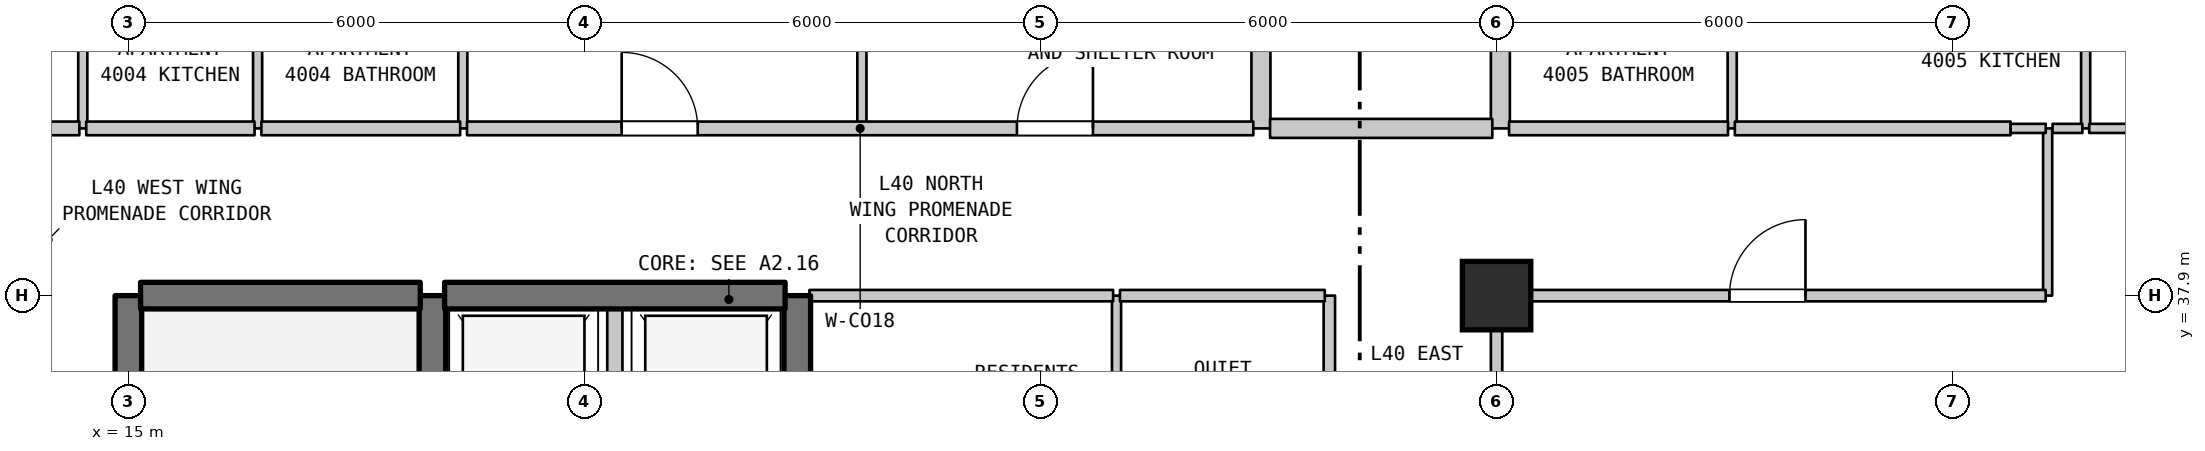
"""IFC4 building model, lengths in metres.
Left out: names, types, materials, properties, quantities, classifications, styles, units other than length and angle.
Written with IfcOpenShell. Run it as: python <this file> out.ifc"""

import sys

from ifc_helpers import new_model, si_unit, direction, frame, frame_2d, origin, origin_2d, place, context, subcontext, project, spatial, rectangle, extrude, element, fill, save


model = new_model("IFC4")
c1 = context("Model", 3, precision=1e-05, world=origin(), true_north=direction((0.0, 1.0)))
c2 = subcontext(c1, "Body", "Model", "MODEL_VIEW")
j1 = project(units=[si_unit("LENGTHUNIT", "METRE"), si_unit("PLANEANGLEUNIT", "RADIAN")], contexts=[c1])
p1 = place(None, origin())
s1 = spatial("IfcSite", under=j1, at=p1, CompositionType="ELEMENT")
p2 = place(p1, origin())
s2 = spatial("IfcBuilding", under=s1, at=p2, CompositionType="ELEMENT")
p3 = place(p2, frame((0.0, 0.0, 164.6)))
s3 = spatial("IfcBuildingStorey", under=s2, at=p3, CompositionType="ELEMENT", Elevation=164.6)
p4 = place(p3, frame((33.0, 37.9, 0.0), z_axis=(0.0, 0.0, 1.0), x_axis=(1.0, 0.0, 0.0)))
e1 = element("IfcColumn", 1, at=p4, inside=s3, PredefinedType="COLUMN", context=c2, shape_type="SweptSolid", body=[
    extrude(rectangle(XDim=0.9, YDim=0.9, at=origin_2d()), origin(), (0.0, 0.0, 1.0), 4.5),
])
p5 = place(p3, frame((39.358, 52.35, 0.0), z_axis=(0.0, 0.0, 1.0), x_axis=(0.224849558511, -0.974393491377, 0.0)))
e2 = element("IfcWall", 2, at=p5, inside=s3, PredefinedType="STANDARD", context=c2, shape_type="SweptSolid", body=[
    extrude(rectangle(XDim=25.093, YDim=0.26, at=frame_2d((12.546, 0.0))), origin(), (0.0, 0.0, 1.0), 4.19),
])
p6 = place(p5, frame((16.689, 0.0, 0.0)))
e3 = element("IfcOpeningElement", 3, at=p6, cuts=e2, PredefinedType="OPENING", context=c2, shape_type="SweptSolid", body=[
    extrude(rectangle(XDim=1.4, YDim=2.2, at=frame_2d((0.7, 1.1))), frame((0.0, 0.14, 0.0), z_axis=(0.0, -1.0, 0.0), x_axis=(1.0, 0.0, 0.0)), (0.0, 0.0, 1.0), 0.28),
])
p7 = place(p5, frame((0.915, 0.0, 0.9)))
e4 = element("IfcOpeningElement", 4, at=p7, cuts=e2, PredefinedType="OPENING", context=c2, shape_type="SweptSolid", body=[
    extrude(rectangle(XDim=1.4, YDim=1.85, at=frame_2d((0.7, 0.925))), frame((0.0, 0.14, 0.0), z_axis=(0.0, -1.0, 0.0), x_axis=(1.0, 0.0, 0.0)), (0.0, 0.0, 1.0), 0.28),
])
p8 = place(p5, frame((3.344, 0.0, 0.9)))
e5 = element("IfcOpeningElement", 5, at=p8, cuts=e2, PredefinedType="OPENING", context=c2, shape_type="SweptSolid", body=[
    extrude(rectangle(XDim=1.3, YDim=1.9, at=frame_2d((0.65, 0.95))), frame((0.0, 0.14, 0.0), z_axis=(0.0, -1.0, 0.0), x_axis=(1.0, 0.0, 0.0)), (0.0, 0.0, 1.0), 0.28),
])
p9 = place(p5, frame((5.323, 0.0, 0.9)))
e6 = element("IfcOpeningElement", 6, at=p9, cuts=e2, PredefinedType="OPENING", context=c2, shape_type="SweptSolid", body=[
    extrude(rectangle(XDim=1.4, YDim=1.85, at=frame_2d((0.7, 0.925))), frame((0.0, 0.14, 0.0), z_axis=(0.0, -1.0, 0.0), x_axis=(1.0, 0.0, 0.0)), (0.0, 0.0, 1.0), 0.28),
])
p10 = place(p5, frame((8.202, 0.0, 0.9)))
e7 = element("IfcOpeningElement", 7, at=p10, cuts=e2, PredefinedType="OPENING", context=c2, shape_type="SweptSolid", body=[
    extrude(rectangle(XDim=1.3, YDim=1.9, at=frame_2d((0.65, 0.95))), frame((0.0, 0.14, 0.0), z_axis=(0.0, -1.0, 0.0), x_axis=(1.0, 0.0, 0.0)), (0.0, 0.0, 1.0), 0.28),
])
p11 = place(p5, frame((10.632, 0.0, 0.9)))
e8 = element("IfcOpeningElement", 8, at=p11, cuts=e2, PredefinedType="OPENING", context=c2, shape_type="SweptSolid", body=[
    extrude(rectangle(XDim=1.4, YDim=1.85, at=frame_2d((0.7, 0.925))), frame((0.0, 0.14, 0.0), z_axis=(0.0, -1.0, 0.0), x_axis=(1.0, 0.0, 0.0)), (0.0, 0.0, 1.0), 0.28),
])
p12 = place(p5, frame((13.061, 0.0, 0.9)))
e9 = element("IfcOpeningElement", 9, at=p12, cuts=e2, PredefinedType="OPENING", context=c2, shape_type="SweptSolid", body=[
    extrude(rectangle(XDim=1.3, YDim=1.9, at=frame_2d((0.65, 0.95))), frame((0.0, 0.14, 0.0), z_axis=(0.0, -1.0, 0.0), x_axis=(1.0, 0.0, 0.0)), (0.0, 0.0, 1.0), 0.28),
])
p13 = place(p5, frame((18.369, 0.0, 0.9)))
e10 = element("IfcOpeningElement", 10, at=p13, cuts=e2, PredefinedType="OPENING", context=c2, shape_type="SweptSolid", body=[
    extrude(rectangle(XDim=1.4, YDim=1.85, at=frame_2d((0.7, 0.925))), frame((0.0, 0.14, 0.0), z_axis=(0.0, -1.0, 0.0), x_axis=(1.0, 0.0, 0.0)), (0.0, 0.0, 1.0), 0.28),
])
p14 = place(p5, frame((20.799, 0.0, 0.9)))
e11 = element("IfcOpeningElement", 11, at=p14, cuts=e2, PredefinedType="OPENING", context=c2, shape_type="SweptSolid", body=[
    extrude(rectangle(XDim=1.3, YDim=1.9, at=frame_2d((0.65, 0.95))), frame((0.0, 0.14, 0.0), z_axis=(0.0, -1.0, 0.0), x_axis=(1.0, 0.0, 0.0)), (0.0, 0.0, 1.0), 0.28),
])
p15 = place(p3, frame((14.4, 40.1, 0.0), z_axis=(0.0, 0.0, 1.0), x_axis=(0.0, 1.0, 0.0)))
e12 = element("IfcWall", 12, at=p15, inside=s3, PredefinedType="PARTITIONING", context=c2, shape_type="SweptSolid", body=[
    extrude(rectangle(XDim=2.3, YDim=0.12, at=frame_2d((1.15, 0.0))), origin(), (0.0, 0.0, 1.0), 4.19),
])
p16 = place(p3, frame((15.0, 31.1, 0.0), z_axis=(0.0, 0.0, 1.0), x_axis=(0.0, 1.0, 0.0)))
e13 = element("IfcWall", 13, at=p16, inside=s3, PredefinedType="SHEAR", context=c2, shape_type="SweptSolid", body=[
    extrude(rectangle(XDim=6.8, YDim=0.35, at=frame_2d((3.4, 0.0))), origin(), (0.0, 0.0, 1.0), 4.19),
])
p17 = place(p3, frame((16.7, 40.1, 0.0), z_axis=(0.0, 0.0, 1.0), x_axis=(0.0, 1.0, 0.0)))
e14 = element("IfcWall", 14, at=p17, inside=s3, PredefinedType="PARTITIONING", context=c2, shape_type="SweptSolid", body=[
    extrude(rectangle(XDim=2.3, YDim=0.12, at=frame_2d((1.15, 0.0))), origin(), (0.0, 0.0, 1.0), 4.19),
])
p18 = place(p3, frame((19.0, 35.0, 0.0), z_axis=(0.0, 0.0, 1.0), x_axis=(0.0, 1.0, 0.0)))
e15 = element("IfcWall", 15, at=p18, inside=s3, PredefinedType="SHEAR", context=c2, shape_type="SweptSolid", body=[
    extrude(rectangle(XDim=2.9, YDim=0.35, at=frame_2d((1.45, 0.0))), origin(), (0.0, 0.0, 1.0), 4.19),
])
p19 = place(p3, frame((19.4, 40.1, 0.0), z_axis=(0.0, 0.0, 1.0), x_axis=(0.0, 1.0, 0.0)))
e16 = element("IfcWall", 16, at=p19, inside=s3, PredefinedType="PARTITIONING", context=c2, shape_type="SweptSolid", body=[
    extrude(rectangle(XDim=2.3, YDim=0.12, at=frame_2d((1.15, 0.0))), origin(), (0.0, 0.0, 1.0), 4.19),
])
p20 = place(p3, frame((21.4, 35.0, 0.0), z_axis=(0.0, 0.0, 1.0), x_axis=(0.0, 1.0, 0.0)))
e17 = element("IfcWall", 17, at=p20, inside=s3, PredefinedType="STANDARD", context=c2, shape_type="SweptSolid", body=[
    extrude(rectangle(XDim=2.9, YDim=0.2, at=frame_2d((1.45, 0.0))), origin(), (0.0, 0.0, 1.0), 4.19),
])
p21 = place(p3, frame((23.8, 35.0, 0.0), z_axis=(0.0, 0.0, 1.0), x_axis=(0.0, 1.0, 0.0)))
e18 = element("IfcWall", 18, at=p21, inside=s3, PredefinedType="SHEAR", context=c2, shape_type="SweptSolid", body=[
    extrude(rectangle(XDim=2.9, YDim=0.35, at=frame_2d((1.45, 0.0))), origin(), (0.0, 0.0, 1.0), 4.19),
])
p22 = place(p3, frame((24.65, 40.1, 0.0), z_axis=(0.0, 0.0, 1.0), x_axis=(0.0, 1.0, 0.0)))
e19 = element("IfcWall", 19, at=p22, inside=s3, PredefinedType="PARTITIONING", context=c2, shape_type="SweptSolid", body=[
    extrude(rectangle(XDim=2.05, YDim=0.12, at=frame_2d((1.025, 0.0))), origin(), (0.0, 0.0, 1.0), 4.19),
])
p23 = place(p3, frame((28.0, 35.0, 0.0), z_axis=(0.0, 0.0, 1.0), x_axis=(0.0, 1.0, 0.0)))
e20 = element("IfcWall", 20, at=p23, inside=s3, PredefinedType="PARTITIONING", context=c2, shape_type="SweptSolid", body=[
    extrude(rectangle(XDim=2.9, YDim=0.12, at=frame_2d((1.45, 0.0))), origin(), (0.0, 0.0, 1.0), 4.19),
])
p24 = place(p3, frame((29.9, 40.1, 0.0), z_axis=(0.0, 0.0, 1.0), x_axis=(0.0, 1.0, 0.0)))
e21 = element("IfcWall", 21, at=p24, inside=s3, PredefinedType="STANDARD", context=c2, shape_type="SweptSolid", body=[
    extrude(rectangle(XDim=2.3, YDim=0.25, at=frame_2d((1.15, 0.0))), origin(), (0.0, 0.0, 1.0), 4.19),
])
p25 = place(p3, frame((30.8, 35.0, 0.0), z_axis=(0.0, 0.0, 1.0), x_axis=(0.0, 1.0, 0.0)))
e22 = element("IfcWall", 22, at=p25, inside=s3, PredefinedType="STANDARD", context=c2, shape_type="SweptSolid", body=[
    extrude(rectangle(XDim=2.9, YDim=0.15, at=frame_2d((1.45, 0.0))), origin(), (0.0, 0.0, 1.0), 4.19),
])
p26 = place(p3, frame((33.0, 32.54, 0.0), z_axis=(0.0, 0.0, 1.0), x_axis=(0.0, 1.0, 0.0)))
e23 = element("IfcWall", 23, at=p26, inside=s3, PredefinedType="STANDARD", context=c2, shape_type="SweptSolid", body=[
    extrude(rectangle(XDim=5.36, YDim=0.15, at=frame_2d((2.68, 0.0))), origin(), (0.0, 0.0, 1.0), 3.69),
])
p27 = place(p26, frame((2.109, 0.0, 0.0)))
e24 = element("IfcOpeningElement", 24, at=p27, cuts=e23, PredefinedType="OPENING", context=c2, shape_type="SweptSolid", body=[
    extrude(rectangle(XDim=1.0, YDim=2.15, at=frame_2d((0.5, 1.075))), frame((0.0, 0.085, 0.0), z_axis=(0.0, -1.0, 0.0), x_axis=(1.0, 0.0, 0.0)), (0.0, 0.0, 1.0), 0.17),
])
p28 = place(p3, frame((33.05, 40.1, 0.0), z_axis=(0.0, 0.0, 1.0), x_axis=(0.0, 1.0, 0.0)))
e25 = element("IfcWall", 25, at=p28, inside=s3, PredefinedType="STANDARD", context=c2, shape_type="SweptSolid", body=[
    extrude(rectangle(XDim=2.3, YDim=0.25, at=frame_2d((1.15, 0.0))), origin(), (0.0, 0.0, 1.0), 3.59),
])
p29 = place(p3, frame((36.1, 40.1, 0.0), z_axis=(0.0, 0.0, 1.0), x_axis=(0.0, 1.0, 0.0)))
e26 = element("IfcWall", 26, at=p29, inside=s3, PredefinedType="PARTITIONING", context=c2, shape_type="SweptSolid", body=[
    extrude(rectangle(XDim=2.3, YDim=0.12, at=frame_2d((1.15, 0.0))), origin(), (0.0, 0.0, 1.0), 4.19),
])
p30 = place(p3, frame((40.25, 37.9, 0.0), z_axis=(0.0, 0.0, 1.0), x_axis=(0.0, 1.0, 0.0)))
e27 = element("IfcWall", 27, at=p30, inside=s3, PredefinedType="PARTITIONING", context=c2, shape_type="SweptSolid", body=[
    extrude(rectangle(XDim=2.2, YDim=0.12, at=frame_2d((1.1, 0.0))), origin(), (0.0, 0.0, 1.0), 4.19),
])
p31 = place(p3, frame((40.75, 40.1, 0.0), z_axis=(0.0, 0.0, 1.0), x_axis=(0.0, 1.0, 0.0)))
e28 = element("IfcWall", 28, at=p31, inside=s3, PredefinedType="PARTITIONING", context=c2, shape_type="SweptSolid", body=[
    extrude(rectangle(XDim=2.3, YDim=0.12, at=frame_2d((1.15, 0.0))), origin(), (0.0, 0.0, 1.0), 4.19),
])
p32 = place(p3, frame((15.16, 37.9, 0.0), z_axis=(0.0, 0.0, 1.0), x_axis=(1.0, 0.0, 0.0)))
e29 = element("IfcWall", 29, at=p32, inside=s3, PredefinedType="SHEAR", context=c2, shape_type="SweptSolid", body=[
    extrude(rectangle(XDim=3.68, YDim=0.35, at=frame_2d((1.84, 0.0))), origin(), (0.0, 0.0, 1.0), 4.19),
])
p33 = place(p3, frame((19.16, 37.9, 0.0), z_axis=(0.0, 0.0, 1.0), x_axis=(1.0, 0.0, 0.0)))
e30 = element("IfcWall", 30, at=p33, inside=s3, PredefinedType="SHEAR", context=c2, shape_type="SweptSolid", body=[
    extrude(rectangle(XDim=4.48, YDim=0.35, at=frame_2d((2.24, 0.0))), origin(), (0.0, 0.0, 1.0), 4.19),
])
p34 = place(p3, frame((23.96, 37.9, 0.0), z_axis=(0.0, 0.0, 1.0), x_axis=(1.0, 0.0, 0.0)))
e31 = element("IfcWall", 31, at=p34, inside=s3, PredefinedType="STANDARD", context=c2, shape_type="SweptSolid", body=[
    extrude(rectangle(XDim=3.995, YDim=0.15, at=frame_2d((1.998, 0.0))), origin(), (0.0, 0.0, 1.0), 3.69),
])
p35 = place(p3, frame((28.045, 37.9, 0.0), z_axis=(0.0, 0.0, 1.0), x_axis=(1.0, 0.0, 0.0)))
e32 = element("IfcWall", 32, at=p35, inside=s3, PredefinedType="STANDARD", context=c2, shape_type="SweptSolid", body=[
    extrude(rectangle(XDim=2.695, YDim=0.15, at=frame_2d((1.348, 0.0))), origin(), (0.0, 0.0, 1.0), 3.69),
])
p36 = place(p3, frame((33.06, 37.9, 0.0), z_axis=(0.0, 0.0, 1.0), x_axis=(1.0, 0.0, 0.0)))
e33 = element("IfcWall", 33, at=p36, inside=s3, PredefinedType="STANDARD", context=c2, shape_type="SweptSolid", body=[
    extrude(rectangle(XDim=7.164, YDim=0.15, at=frame_2d((3.582, 0.0))), origin(), (0.0, 0.0, 1.0), 4.19),
])
p37 = place(p36, frame((3.004, 0.0, 0.0)))
e34 = element("IfcOpeningElement", 34, at=p37, cuts=e33, PredefinedType="OPENING", context=c2, shape_type="SweptSolid", body=[
    extrude(rectangle(XDim=1.0, YDim=2.15, at=frame_2d((0.5, 1.075))), frame((0.0, 0.085, 0.0), z_axis=(0.0, -1.0, 0.0), x_axis=(1.0, 0.0, 0.0)), (0.0, 0.0, 1.0), 0.17),
])
p38 = place(p3, frame((12.875, 40.1, 0.0), z_axis=(0.0, 0.0, 1.0), x_axis=(1.0, 0.0, 0.0)))
e35 = element("IfcWall", 35, at=p38, inside=s3, PredefinedType="STANDARD", context=c2, shape_type="SweptSolid", body=[
    extrude(rectangle(XDim=1.48, YDim=0.18, at=frame_2d((0.74, 0.0))), origin(), (0.0, 0.0, 1.0), 4.19),
])
p39 = place(p3, frame((14.445, 40.1, 0.0), z_axis=(0.0, 0.0, 1.0), x_axis=(1.0, 0.0, 0.0)))
e36 = element("IfcWall", 36, at=p39, inside=s3, PredefinedType="STANDARD", context=c2, shape_type="SweptSolid", body=[
    extrude(rectangle(XDim=2.215, YDim=0.18, at=frame_2d((1.107, 0.0))), origin(), (0.0, 0.0, 1.0), 4.19),
])
p40 = place(p3, frame((16.75, 40.1, 0.0), z_axis=(0.0, 0.0, 1.0), x_axis=(1.0, 0.0, 0.0)))
e37 = element("IfcWall", 37, at=p40, inside=s3, PredefinedType="STANDARD", context=c2, shape_type="SweptSolid", body=[
    extrude(rectangle(XDim=2.615, YDim=0.18, at=frame_2d((1.308, 0.0))), origin(), (0.0, 0.0, 1.0), 4.19),
])
p41 = place(p3, frame((19.455, 40.1, 0.0), z_axis=(0.0, 0.0, 1.0), x_axis=(1.0, 0.0, 0.0)))
e38 = element("IfcWall", 38, at=p41, inside=s3, PredefinedType="STANDARD", context=c2, shape_type="SweptSolid", body=[
    extrude(rectangle(XDim=10.345, YDim=0.18, at=frame_2d((5.172, 0.0))), origin(), (0.0, 0.0, 1.0), 4.19),
])
p42 = place(p41, frame((2.035, 0.0, 0.0)))
e39 = element("IfcOpeningElement", 39, at=p42, cuts=e38, PredefinedType="OPENING", context=c2, shape_type="SweptSolid", body=[
    extrude(rectangle(XDim=1.0, YDim=2.15, at=frame_2d((0.5, 1.075))), frame((0.0, 0.1, 0.0), z_axis=(0.0, -1.0, 0.0), x_axis=(1.0, 0.0, 0.0)), (0.0, 0.0, 1.0), 0.2),
])
p43 = place(p41, frame((7.235, 0.0, 0.0)))
e40 = element("IfcOpeningElement", 40, at=p43, cuts=e38, PredefinedType="OPENING", context=c2, shape_type="SweptSolid", body=[
    extrude(rectangle(XDim=1.0, YDim=2.15, at=frame_2d((0.5, 1.075))), frame((0.0, 0.1, 0.0), z_axis=(0.0, -1.0, 0.0), x_axis=(1.0, 0.0, 0.0)), (0.0, 0.0, 1.0), 0.2),
])
p44 = place(p3, frame((30.02, 40.1, 0.0), z_axis=(0.0, 0.0, 1.0), x_axis=(1.0, 0.0, 0.0)))
e41 = element("IfcWall", 41, at=p44, inside=s3, PredefinedType="STANDARD", context=c2, shape_type="SweptSolid", body=[
    extrude(rectangle(XDim=2.924, YDim=0.25, at=frame_2d((1.462, 0.0))), origin(), (0.0, 0.0, 1.0), 4.19),
])
p45 = place(p3, frame((33.164, 40.1, 0.0), z_axis=(0.0, 0.0, 1.0), x_axis=(1.0, 0.0, 0.0)))
e42 = element("IfcWall", 42, at=p45, inside=s3, PredefinedType="STANDARD", context=c2, shape_type="SweptSolid", body=[
    extrude(rectangle(XDim=2.881, YDim=0.18, at=frame_2d((1.44, 0.0))), origin(), (0.0, 0.0, 1.0), 4.19),
])
p46 = place(p3, frame((36.135, 40.1, 0.0), z_axis=(0.0, 0.0, 1.0), x_axis=(1.0, 0.0, 0.0)))
e43 = element("IfcWall", 43, at=p46, inside=s3, PredefinedType="STANDARD", context=c2, shape_type="SweptSolid", body=[
    extrude(rectangle(XDim=3.628, YDim=0.18, at=frame_2d((1.814, 0.0))), origin(), (0.0, 0.0, 1.0), 4.19),
])
p47 = place(p3, frame((39.763, 40.1, 0.0), z_axis=(0.0, 0.0, 1.0), x_axis=(1.0, 0.0, 0.0)))
e44 = element("IfcWall", 44, at=p47, inside=s3, PredefinedType="PARTITIONING", context=c2, shape_type="SweptSolid", body=[
    extrude(rectangle(XDim=0.462, YDim=0.12, at=frame_2d((0.231, 0.0))), origin(), (0.0, 0.0, 1.0), 4.19),
])
p48 = place(p3, frame((40.315, 40.1, 0.0), z_axis=(0.0, 0.0, 1.0), x_axis=(1.0, 0.0, 0.0)))
e45 = element("IfcWall", 45, at=p48, inside=s3, PredefinedType="PARTITIONING", context=c2, shape_type="SweptSolid", body=[
    extrude(rectangle(XDim=0.392, YDim=0.12, at=frame_2d((0.196, 0.0))), origin(), (0.0, 0.0, 1.0), 4.19),
])
p49 = place(p3, frame((40.797, 40.1, 0.0), z_axis=(0.0, 0.0, 1.0), x_axis=(1.0, 0.0, 0.0)))
e46 = element("IfcWall", 46, at=p49, inside=s3, PredefinedType="PARTITIONING", context=c2, shape_type="SweptSolid", body=[
    extrude(rectangle(XDim=1.378, YDim=0.12, at=frame_2d((0.689, 0.0))), origin(), (0.0, 0.0, 1.0), 4.19),
])
p50 = place(p37, origin())
e47 = element("IfcDoor", 47, at=p50, inside=s3, OperationType="SINGLE_SWING_RIGHT", PredefinedType="DOOR", context=c2, shape_type="SweptSolid", body=[
    extrude(rectangle(XDim=1.0, YDim=2.15, at=frame_2d((0.5, 1.075))), frame((0.0, 0.025, 0.0), z_axis=(0.0, -1.0, 0.0), x_axis=(1.0, 0.0, 0.0)), (0.0, 0.0, 1.0), 0.05),
])
fill(e34, e47)
p51 = place(p42, origin())
e48 = element("IfcDoor", 48, at=p51, inside=s3, OperationType="SINGLE_SWING_LEFT", PredefinedType="DOOR", context=c2, shape_type="SweptSolid", body=[
    extrude(rectangle(XDim=1.0, YDim=2.15, at=frame_2d((0.5, 1.075))), frame((0.0, 0.025, 0.0), z_axis=(0.0, -1.0, 0.0), x_axis=(1.0, 0.0, 0.0)), (0.0, 0.0, 1.0), 0.05),
])
fill(e39, e48)
p52 = place(p43, origin())
e49 = element("IfcDoor", 49, at=p52, inside=s3, OperationType="SINGLE_SWING_RIGHT", PredefinedType="DOOR", context=c2, shape_type="SweptSolid", body=[
    extrude(rectangle(XDim=1.0, YDim=2.15, at=frame_2d((0.5, 1.075))), frame((0.0, 0.025, 0.0), z_axis=(0.0, -1.0, 0.0), x_axis=(1.0, 0.0, 0.0)), (0.0, 0.0, 1.0), 0.05),
])
fill(e40, e49)
save(model, sys.argv[1])
